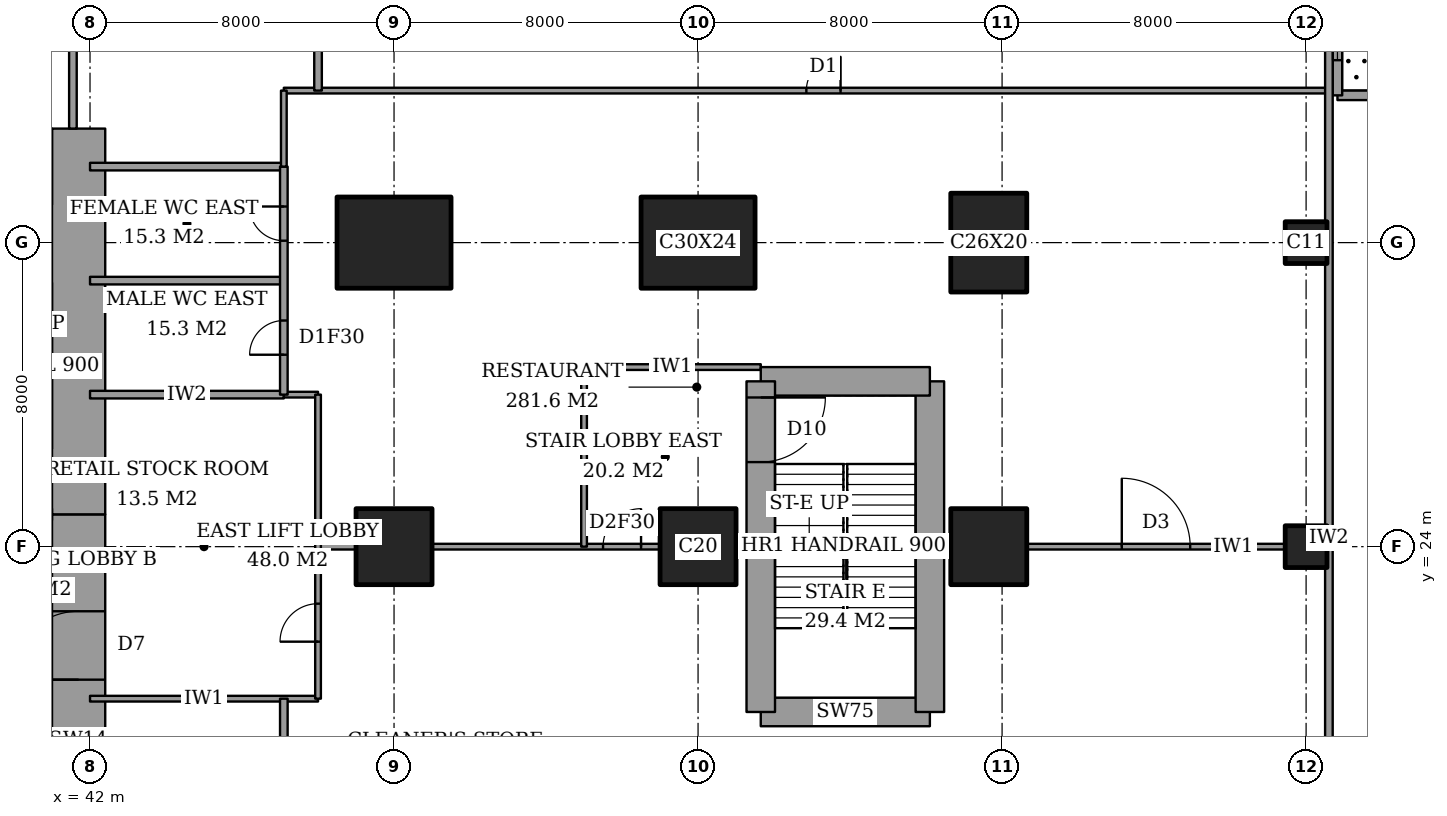
"""IFC4 building model, lengths in metres.
Left out: names, types, materials, properties, quantities, classifications, styles, units other than length and angle.
Written with IfcOpenShell. Run it as: python <this file> out.ifc"""

import sys

from ifc_helpers import new_model, si_unit, direction, frame, frame_2d, origin, origin_2d, place, context, subcontext, project, spatial, rectangle, extrude, element, fill, save


model = new_model("IFC4")
c1 = context("Model", 3, precision=1e-05, world=origin(), true_north=direction((0.0, 1.0)))
c2 = subcontext(c1, "Body", "Model", "MODEL_VIEW")
j1 = project(units=[si_unit("LENGTHUNIT", "METRE"), si_unit("PLANEANGLEUNIT", "RADIAN")], contexts=[c1])
p1 = place(None, origin())
s1 = spatial("IfcSite", under=j1, at=p1, CompositionType="ELEMENT")
p2 = place(p1, origin())
s2 = spatial("IfcBuilding", under=s1, at=p2, CompositionType="ELEMENT")
p3 = place(p2, origin())
s3 = spatial("IfcBuildingStorey", under=s2, at=p3, CompositionType="ELEMENT", Elevation=0.0)
p4 = place(p3, frame((50.0, 24.0, 0.0), z_axis=(0.0, 0.0, 1.0), x_axis=(1.0, 0.0, 0.0)))
e1 = element("IfcColumn", 1, at=p4, inside=s3, PredefinedType="COLUMN", context=c2, shape_type="SweptSolid", body=[
    extrude(rectangle(XDim=2.0, YDim=2.0, at=origin_2d()), origin(), (0.0, 0.0, 1.0), 6.0),
])
p5 = place(p3, frame((50.0, 32.0, 0.0), z_axis=(0.0, 0.0, 1.0), x_axis=(1.0, 0.0, 0.0)))
e2 = element("IfcColumn", 2, at=p5, inside=s3, PredefinedType="COLUMN", context=c2, shape_type="SweptSolid", body=[
    extrude(rectangle(XDim=3.0, YDim=2.4, at=origin_2d()), origin(), (0.0, 0.0, 1.0), 6.0),
])
p6 = place(p3, frame((58.0, 24.0, 0.0), z_axis=(0.0, 0.0, 1.0), x_axis=(1.0, 0.0, 0.0)))
e3 = element("IfcColumn", 3, at=p6, inside=s3, PredefinedType="COLUMN", context=c2, shape_type="SweptSolid", body=[
    extrude(rectangle(XDim=2.0, YDim=2.0, at=origin_2d()), origin(), (0.0, 0.0, 1.0), 6.0),
])
p7 = place(p3, frame((58.0, 32.0, 0.0), z_axis=(0.0, 0.0, 1.0), x_axis=(1.0, 0.0, 0.0)))
e4 = element("IfcColumn", 4, at=p7, inside=s3, PredefinedType="COLUMN", context=c2, shape_type="SweptSolid", body=[
    extrude(rectangle(XDim=3.0, YDim=2.4, at=origin_2d()), origin(), (0.0, 0.0, 1.0), 6.0),
])
p8 = place(p3, frame((65.65, 24.0, 0.0), z_axis=(0.0, 0.0, 1.0), x_axis=(1.0, 0.0, 0.0)))
e5 = element("IfcColumn", 5, at=p8, inside=s3, PredefinedType="COLUMN", context=c2, shape_type="SweptSolid", body=[
    extrude(rectangle(XDim=2.0, YDim=2.0, at=origin_2d()), origin(), (0.0, 0.0, 1.0), 6.0),
])
p9 = place(p3, frame((65.65, 32.0, 0.0), z_axis=(0.0, 0.0, 1.0), x_axis=(0.0, 1.0, 0.0)))
e6 = element("IfcColumn", 6, at=p9, inside=s3, PredefinedType="COLUMN", context=c2, shape_type="SweptSolid", body=[
    extrude(rectangle(XDim=2.6, YDim=2.0, at=origin_2d()), origin(), (0.0, 0.0, 1.0), 6.0),
])
for number, where, z_axis, x_axis in (
    (7, (74.0, 24.0, 0.0), (0.0, 0.0, 1.0), (1.0, 0.0, 0.0)),
    (8, (74.0, 32.0, 0.0), (0.0, 0.0, 1.0), (1.0, 0.0, 0.0)),
):
    element("IfcColumn", number, at=place(p3, frame(where, z_axis=z_axis, x_axis=x_axis)), inside=s3, PredefinedType="COLUMN", context=c2, shape_type="SweptSolid", body=[
        extrude(rectangle(XDim=1.1, YDim=1.1, at=origin_2d()), origin(), (0.0, 0.0, 1.0), 6.0),
    ])
p10 = place(p3, frame((41.7, 13.0, 0.0), z_axis=(0.0, 0.0, 1.0), x_axis=(0.0, 1.0, 0.0)))
e9 = element("IfcWall", 9, at=p10, inside=s3, PredefinedType="SHEAR", context=c2, shape_type="SweptSolid", body=[
    extrude(rectangle(XDim=11.85, YDim=1.4, at=frame_2d((5.925, 0.0))), origin(), (0.0, 0.0, 1.0), 6.0),
])
p11 = place(p10, frame((7.5, 0.0, 0.0)))
e10 = element("IfcOpeningElement", 10, at=p11, cuts=e9, PredefinedType="OPENING", context=c2, shape_type="SweptSolid", body=[
    extrude(rectangle(XDim=1.8, YDim=2.4, at=frame_2d((0.9, 1.2))), frame((0.0, 0.71, 0.0), z_axis=(0.0, -1.0, 0.0), x_axis=(1.0, 0.0, 0.0)), (0.0, 0.0, 1.0), 1.42),
])
p12 = place(p3, frame((41.7, 24.85, 0.0), z_axis=(0.0, 0.0, 1.0), x_axis=(0.0, 1.0, 0.0)))
e11 = element("IfcWall", 11, at=p12, inside=s3, PredefinedType="SHEAR", context=c2, shape_type="SweptSolid", body=[
    extrude(rectangle(XDim=10.15, YDim=1.4, at=frame_2d((5.075, 0.0))), origin(), (0.0, 0.0, 1.0), 6.0),
])
p13 = place(p3, frame((59.65, 19.65, 0.0), z_axis=(0.0, 0.0, 1.0), x_axis=(1.0, 0.0, 0.0)))
e12 = element("IfcWall", 12, at=p13, inside=s3, PredefinedType="SHEAR", context=c2, shape_type="SweptSolid", body=[
    extrude(rectangle(XDim=4.45, YDim=0.75, at=frame_2d((2.225, 0.0))), origin(), (0.0, 0.0, 1.0), 6.0),
])
p14 = place(p3, frame((64.1, 19.65, 0.0), z_axis=(0.0, 0.0, 1.0), x_axis=(0.0, 1.0, 0.0)))
e13 = element("IfcWall", 13, at=p14, inside=s3, PredefinedType="SHEAR", context=c2, shape_type="SweptSolid", body=[
    extrude(rectangle(XDim=8.7, YDim=0.75, at=frame_2d((4.35, 0.0))), origin(), (0.0, 0.0, 1.0), 6.0),
])
p15 = place(p3, frame((64.1, 28.35, 0.0), z_axis=(0.0, 0.0, 1.0), x_axis=(-1.0, 0.0, 0.0)))
e14 = element("IfcWall", 14, at=p15, inside=s3, PredefinedType="SHEAR", context=c2, shape_type="SweptSolid", body=[
    extrude(rectangle(XDim=4.45, YDim=0.75, at=frame_2d((2.225, 0.0))), origin(), (0.0, 0.0, 1.0), 6.0),
])
p16 = place(p3, frame((59.65, 28.35, 0.0), z_axis=(0.0, 0.0, 1.0), x_axis=(0.0, -1.0, 0.0)))
e15 = element("IfcWall", 15, at=p16, inside=s3, PredefinedType="SHEAR", context=c2, shape_type="SweptSolid", body=[
    extrude(rectangle(XDim=8.7, YDim=0.75, at=frame_2d((4.35, 0.0))), origin(), (0.0, 0.0, 1.0), 6.0),
])
p17 = place(p16, frame((0.425, 0.0, 0.0)))
e16 = element("IfcOpeningElement", 16, at=p17, cuts=e15, PredefinedType="OPENING", context=c2, shape_type="SweptSolid", body=[
    extrude(rectangle(XDim=1.7, YDim=2.1, at=frame_2d((0.85, 1.05))), frame((0.0, 0.385, 0.0), z_axis=(0.0, -1.0, 0.0), x_axis=(1.0, 0.0, 0.0)), (0.0, 0.0, 1.0), 0.77),
])
p18 = place(p3, frame((82.575, 35.875, 0.0), z_axis=(0.0, 0.0, 1.0), x_axis=(-1.0, 0.0, 0.0)))
e17 = element("IfcWall", 17, at=p18, inside=s3, PredefinedType="SOLIDWALL", context=c2, shape_type="SweptSolid", body=[
    extrude(rectangle(XDim=7.75, YDim=0.25, at=frame_2d((3.875, 0.0))), origin(), (0.0, 0.0, 1.0), 6.0),
])
p19 = place(p3, frame((74.825, 35.875, 0.0), z_axis=(0.0, 0.0, 1.0), x_axis=(0.0, 1.0, 0.0)))
e18 = element("IfcWall", 18, at=p19, inside=s3, PredefinedType="SOLIDWALL", context=c2, shape_type="SweptSolid", body=[
    extrude(rectangle(XDim=20.7, YDim=0.25, at=frame_2d((10.35, 0.0))), origin(), (0.0, 0.0, 1.0), 6.0),
])
p20 = place(p19, frame((4.925, 0.0, 0.3)))
e19 = element("IfcOpeningElement", 19, at=p20, cuts=e18, PredefinedType="OPENING", context=c2, shape_type="SweptSolid", body=[
    extrude(rectangle(XDim=2.4, YDim=3.6, at=frame_2d((1.2, 1.8))), frame((0.0, 0.135, 0.0), z_axis=(0.0, -1.0, 0.0), x_axis=(1.0, 0.0, 0.0)), (0.0, 0.0, 1.0), 0.27),
])
p21 = place(p19, frame((8.925, 0.0, 0.3)))
e20 = element("IfcOpeningElement", 20, at=p21, cuts=e18, PredefinedType="OPENING", context=c2, shape_type="SweptSolid", body=[
    extrude(rectangle(XDim=2.4, YDim=3.6, at=frame_2d((1.2, 1.8))), frame((0.0, 0.135, 0.0), z_axis=(0.0, -1.0, 0.0), x_axis=(1.0, 0.0, 0.0)), (0.0, 0.0, 1.0), 0.27),
])
p22 = place(p19, frame((0.925, 0.0, 0.3)))
e21 = element("IfcOpeningElement", 21, at=p22, cuts=e18, PredefinedType="OPENING", context=c2, shape_type="SweptSolid", body=[
    extrude(rectangle(XDim=2.4, YDim=3.6, at=frame_2d((1.2, 1.8))), frame((0.0, 0.135, 0.0), z_axis=(0.0, -1.0, 0.0), x_axis=(1.0, 0.0, 0.0)), (0.0, 0.0, 1.0), 0.27),
])
p23 = place(p3, frame((42.0, 20.0, 0.0), z_axis=(0.0, 0.0, 1.0), x_axis=(1.0, 0.0, 0.0)))
e22 = element("IfcWall", 22, at=p23, inside=s3, PredefinedType="PARTITIONING", context=c2, shape_type="SweptSolid", body=[
    extrude(rectangle(XDim=6.0, YDim=0.15, at=frame_2d((3.0, 0.0))), origin(), (0.0, 0.0, 1.0), 5.7),
])
p24 = place(p3, frame((48.0, 24.0, 0.0), z_axis=(0.0, 0.0, 1.0), x_axis=(1.0, 0.0, 0.0)))
e23 = element("IfcWall", 23, at=p24, inside=s3, PredefinedType="PARTITIONING", context=c2, shape_type="SweptSolid", body=[
    extrude(rectangle(XDim=1.0, YDim=0.15, at=frame_2d((0.5, 0.0))), origin(), (0.0, 0.0, 1.0), 5.7),
])
p25 = place(p3, frame((51.0, 24.0, 0.0), z_axis=(0.0, 0.0, 1.0), x_axis=(1.0, 0.0, 0.0)))
e24 = element("IfcWall", 24, at=p25, inside=s3, PredefinedType="PARTITIONING", context=c2, shape_type="SweptSolid", body=[
    extrude(rectangle(XDim=6.0, YDim=0.15, at=frame_2d((3.0, 0.0))), origin(), (0.0, 0.0, 1.0), 4.3),
])
p26 = place(p25, frame((4.5, 0.0, 0.0)))
e25 = element("IfcOpeningElement", 25, at=p26, cuts=e24, PredefinedType="OPENING", context=c2, shape_type="SweptSolid", body=[
    extrude(rectangle(XDim=1.0, YDim=2.1, at=frame_2d((0.5, 1.05))), frame((0.0, 0.085, 0.0), z_axis=(0.0, -1.0, 0.0), x_axis=(1.0, 0.0, 0.0)), (0.0, 0.0, 1.0), 0.17),
])
p27 = place(p3, frame((66.65, 24.0, 0.0), z_axis=(0.0, 0.0, 1.0), x_axis=(1.0, 0.0, 0.0)))
e26 = element("IfcWall", 26, at=p27, inside=s3, PredefinedType="PARTITIONING", context=c2, shape_type="SweptSolid", body=[
    extrude(rectangle(XDim=6.8, YDim=0.15, at=frame_2d((3.4, 0.0))), origin(), (0.0, 0.0, 1.0), 4.3),
])
p28 = place(p27, frame((2.5, 0.0, 0.0)))
e27 = element("IfcOpeningElement", 27, at=p28, cuts=e26, PredefinedType="OPENING", context=c2, shape_type="SweptSolid", body=[
    extrude(rectangle(XDim=1.8, YDim=2.1, at=frame_2d((0.9, 1.05))), frame((0.0, 0.085, 0.0), z_axis=(0.0, -1.0, 0.0), x_axis=(1.0, 0.0, 0.0)), (0.0, 0.0, 1.0), 0.17),
])
p29 = place(p3, frame((42.0, 28.0, 0.0), z_axis=(0.0, 0.0, 1.0), x_axis=(1.0, 0.0, 0.0)))
e28 = element("IfcWall", 28, at=p29, inside=s3, PredefinedType="PARTITIONING", context=c2, shape_type="SweptSolid", body=[
    extrude(rectangle(XDim=5.1, YDim=0.2, at=frame_2d((2.55, 0.0))), origin(), (0.0, 0.0, 1.0), 5.7),
])
p30 = place(p3, frame((47.1, 28.0, 0.0), z_axis=(0.0, 0.0, 1.0), x_axis=(1.0, 0.0, 0.0)))
e29 = element("IfcWall", 29, at=p30, inside=s3, PredefinedType="PARTITIONING", context=c2, shape_type="SweptSolid", body=[
    extrude(rectangle(XDim=0.9, YDim=0.15, at=frame_2d((0.45, 0.0))), origin(), (0.0, 0.0, 1.0), 5.7),
])
p31 = place(p3, frame((55.0, 28.725, 0.0), z_axis=(0.0, 0.0, 1.0), x_axis=(1.0, 0.0, 0.0)))
e30 = element("IfcWall", 30, at=p31, inside=s3, PredefinedType="PARTITIONING", context=c2, shape_type="SweptSolid", body=[
    extrude(rectangle(XDim=4.65, YDim=0.15, at=frame_2d((2.325, 0.0))), origin(), (0.0, 0.0, 1.0), 5.7),
])
for number, where, z_axis, x_axis in (
    (31, (42.0, 31.0, 0.0), (0.0, 0.0, 1.0), (1.0, 0.0, 0.0)),
    (32, (42.0, 34.0, 0.0), (0.0, 0.0, 1.0), (1.0, 0.0, 0.0)),
):
    element("IfcWall", number, at=place(p3, frame(where, z_axis=z_axis, x_axis=x_axis)), inside=s3, PredefinedType="PARTITIONING", context=c2, shape_type="SweptSolid", body=[
        extrude(rectangle(XDim=5.1, YDim=0.2, at=frame_2d((2.55, 0.0))), origin(), (0.0, 0.0, 1.0), 5.7),
    ])
p32 = place(p3, frame((47.1, 36.0, 0.0), z_axis=(0.0, 0.0, 1.0), x_axis=(1.0, 0.0, 0.0)))
e33 = element("IfcWall", 33, at=p32, inside=s3, PredefinedType="PARTITIONING", context=c2, shape_type="SweptSolid", body=[
    extrude(rectangle(XDim=27.5, YDim=0.15, at=frame_2d((13.75, 0.0))), origin(), (0.0, 0.0, 1.0), 5.7),
])
p33 = place(p32, frame((13.75, 0.0, 0.0)))
e34 = element("IfcOpeningElement", 34, at=p33, cuts=e33, PredefinedType="OPENING", context=c2, shape_type="SweptSolid", body=[
    extrude(rectangle(XDim=0.9, YDim=2.1, at=frame_2d((0.45, 1.05))), frame((0.0, 0.085, 0.0), z_axis=(0.0, -1.0, 0.0), x_axis=(1.0, 0.0, 0.0)), (0.0, 0.0, 1.0), 0.17),
])
p34 = place(p3, frame((41.55, 35.0, 0.0), z_axis=(0.0, 0.0, 1.0), x_axis=(0.0, 1.0, 0.0)))
e35 = element("IfcWall", 35, at=p34, inside=s3, PredefinedType="PARTITIONING", context=c2, shape_type="SweptSolid", body=[
    extrude(rectangle(XDim=3.7, YDim=0.2, at=frame_2d((1.85, 0.0))), origin(), (0.0, 0.0, 1.0), 5.7),
])
p35 = place(p3, frame((47.1, 0.0, 0.0), z_axis=(0.0, 0.0, 1.0), x_axis=(0.0, 1.0, 0.0)))
e36 = element("IfcWall", 36, at=p35, inside=s3, PredefinedType="PARTITIONING", context=c2, shape_type="SweptSolid", body=[
    extrude(rectangle(XDim=20.0, YDim=0.2, at=frame_2d((10.0, 0.0))), origin(), (0.0, 0.0, 1.0), 5.7),
])
p36 = place(p35, frame((15.05, 0.0, 0.0)))
e37 = element("IfcOpeningElement", 37, at=p36, cuts=e36, PredefinedType="OPENING", context=c2, shape_type="SweptSolid", body=[
    extrude(rectangle(XDim=0.9, YDim=2.1, at=frame_2d((0.45, 1.05))), frame((0.0, 0.11, 0.0), z_axis=(0.0, -1.0, 0.0), x_axis=(1.0, 0.0, 0.0)), (0.0, 0.0, 1.0), 0.22),
])
p37 = place(p35, frame((18.05, 0.0, 0.0)))
e38 = element("IfcOpeningElement", 38, at=p37, cuts=e36, PredefinedType="OPENING", context=c2, shape_type="SweptSolid", body=[
    extrude(rectangle(XDim=0.9, YDim=2.1, at=frame_2d((0.45, 1.05))), frame((0.0, 0.11, 0.0), z_axis=(0.0, -1.0, 0.0), x_axis=(1.0, 0.0, 0.0)), (0.0, 0.0, 1.0), 0.22),
])
p38 = place(p3, frame((47.1, 28.0, 0.0), z_axis=(0.0, 0.0, 1.0), x_axis=(0.0, 1.0, 0.0)))
e39 = element("IfcWall", 39, at=p38, inside=s3, PredefinedType="PARTITIONING", context=c2, shape_type="SweptSolid", body=[
    extrude(rectangle(XDim=6.0, YDim=0.2, at=frame_2d((3.0, 0.0))), origin(), (0.0, 0.0, 1.0), 5.7),
])
p39 = place(p38, frame((1.05, 0.0, 0.0)))
e40 = element("IfcOpeningElement", 40, at=p39, cuts=e39, PredefinedType="OPENING", context=c2, shape_type="SweptSolid", body=[
    extrude(rectangle(XDim=0.9, YDim=2.1, at=frame_2d((0.45, 1.05))), frame((0.0, 0.11, 0.0), z_axis=(0.0, -1.0, 0.0), x_axis=(1.0, 0.0, 0.0)), (0.0, 0.0, 1.0), 0.22),
])
p40 = place(p38, frame((4.05, 0.0, 0.0)))
e41 = element("IfcOpeningElement", 41, at=p40, cuts=e39, PredefinedType="OPENING", context=c2, shape_type="SweptSolid", body=[
    extrude(rectangle(XDim=0.9, YDim=2.1, at=frame_2d((0.45, 1.05))), frame((0.0, 0.11, 0.0), z_axis=(0.0, -1.0, 0.0), x_axis=(1.0, 0.0, 0.0)), (0.0, 0.0, 1.0), 0.22),
])
p41 = place(p3, frame((47.1, 34.0, 0.0), z_axis=(0.0, 0.0, 1.0), x_axis=(0.0, 1.0, 0.0)))
e42 = element("IfcWall", 42, at=p41, inside=s3, PredefinedType="PARTITIONING", context=c2, shape_type="SweptSolid", body=[
    extrude(rectangle(XDim=2.0, YDim=0.15, at=frame_2d((1.0, 0.0))), origin(), (0.0, 0.0, 1.0), 5.7),
])
p42 = place(p3, frame((48.0, 36.0, 0.0), z_axis=(0.0, 0.0, 1.0), x_axis=(0.0, 1.0, 0.0)))
e43 = element("IfcWall", 43, at=p42, inside=s3, PredefinedType="PARTITIONING", context=c2, shape_type="SweptSolid", body=[
    extrude(rectangle(XDim=12.45, YDim=0.2, at=frame_2d((6.225, 0.0))), origin(), (0.0, 0.0, 1.0), 5.7),
])
p43 = place(p3, frame((48.0, 20.0, 0.0), z_axis=(0.0, 0.0, 1.0), x_axis=(0.0, 1.0, 0.0)))
e44 = element("IfcWall", 44, at=p43, inside=s3, PredefinedType="PARTITIONING", context=c2, shape_type="SweptSolid", body=[
    extrude(rectangle(XDim=8.0, YDim=0.15, at=frame_2d((4.0, 0.0))), origin(), (0.0, 0.0, 1.0), 5.7),
])
p44 = place(p43, frame((1.5, 0.0, 0.0)))
e45 = element("IfcOpeningElement", 45, at=p44, cuts=e44, PredefinedType="OPENING", context=c2, shape_type="SweptSolid", body=[
    extrude(rectangle(XDim=1.0, YDim=2.1, at=frame_2d((0.5, 1.05))), frame((0.0, 0.085, 0.0), z_axis=(0.0, -1.0, 0.0), x_axis=(1.0, 0.0, 0.0)), (0.0, 0.0, 1.0), 0.17),
])
p45 = place(p3, frame((55.0, 24.0, 0.0), z_axis=(0.0, 0.0, 1.0), x_axis=(0.0, 1.0, 0.0)))
e46 = element("IfcWall", 46, at=p45, inside=s3, PredefinedType="PARTITIONING", context=c2, shape_type="SweptSolid", body=[
    extrude(rectangle(XDim=4.725, YDim=0.15, at=frame_2d((2.363, 0.0))), origin(), (0.0, 0.0, 1.0), 5.7),
])
p46 = place(p3, frame((74.6, 0.0, 0.0), z_axis=(0.0, 0.0, 1.0), x_axis=(0.0, 1.0, 0.0)))
e47 = element("IfcWall", 47, at=p46, inside=s3, PredefinedType="PARTITIONING", context=c2, shape_type="SweptSolid", body=[
    extrude(rectangle(XDim=48.45, YDim=0.2, at=frame_2d((24.225, 0.0))), origin(), (0.0, 0.0, 1.0), 5.7),
])
p47 = place(p22, origin())
e48 = element("IfcWindow", 48, at=p47, inside=s3, PartitioningType="SINGLE_PANEL", PredefinedType="WINDOW", context=c2, shape_type="SweptSolid", body=[
    extrude(rectangle(XDim=2.4, YDim=3.6, at=frame_2d((1.2, 1.8))), frame((0.0, 0.03, 0.0), z_axis=(0.0, -1.0, 0.0), x_axis=(1.0, 0.0, 0.0)), (0.0, 0.0, 1.0), 0.06),
])
fill(e21, e48)
p48 = place(p44, origin())
e49 = element("IfcDoor", 49, at=p48, inside=s3, OperationType="SINGLE_SWING_RIGHT", PredefinedType="DOOR", context=c2, shape_type="SweptSolid", body=[
    extrude(rectangle(XDim=1.0, YDim=2.1, at=frame_2d((0.5, 1.05))), frame((0.0, 0.025, 0.0), z_axis=(0.0, -1.0, 0.0), x_axis=(1.0, 0.0, 0.0)), (0.0, 0.0, 1.0), 0.05),
])
fill(e45, e49)
p49 = place(p26, origin())
e50 = element("IfcDoor", 50, at=p49, inside=s3, OperationType="SINGLE_SWING_LEFT", PredefinedType="DOOR", context=c2, shape_type="SweptSolid", body=[
    extrude(rectangle(XDim=1.0, YDim=2.1, at=frame_2d((0.5, 1.05))), frame((0.0, 0.025, 0.0), z_axis=(0.0, -1.0, 0.0), x_axis=(1.0, 0.0, 0.0)), (0.0, 0.0, 1.0), 0.05),
])
fill(e25, e50)
p50 = place(p28, origin())
e51 = element("IfcDoor", 51, at=p50, inside=s3, OperationType="DOUBLE_DOOR_DOUBLE_SWING", PredefinedType="DOOR", context=c2, shape_type="SweptSolid", body=[
    extrude(rectangle(XDim=1.8, YDim=2.1, at=frame_2d((0.9, 1.05))), frame((0.0, 0.025, 0.0), z_axis=(0.0, -1.0, 0.0), x_axis=(1.0, 0.0, 0.0)), (0.0, 0.0, 1.0), 0.05),
])
fill(e27, e51)
p51 = place(p33, origin())
e52 = element("IfcDoor", 52, at=p51, inside=s3, OperationType="SINGLE_SWING_LEFT", PredefinedType="DOOR", context=c2, shape_type="SweptSolid", body=[
    extrude(rectangle(XDim=0.9, YDim=2.1, at=frame_2d((0.45, 1.05))), frame((0.0, 0.025, 0.0), z_axis=(0.0, -1.0, 0.0), x_axis=(1.0, 0.0, 0.0)), (0.0, 0.0, 1.0), 0.05),
])
fill(e34, e52)
p52 = place(p39, origin())
e53 = element("IfcDoor", 53, at=p52, inside=s3, OperationType="SINGLE_SWING_RIGHT", PredefinedType="DOOR", context=c2, shape_type="SweptSolid", body=[
    extrude(rectangle(XDim=0.9, YDim=2.1, at=frame_2d((0.45, 1.05))), frame((0.0, 0.025, 0.0), z_axis=(0.0, -1.0, 0.0), x_axis=(1.0, 0.0, 0.0)), (0.0, 0.0, 1.0), 0.05),
])
fill(e40, e53)
p53 = place(p40, origin())
e54 = element("IfcDoor", 54, at=p53, inside=s3, OperationType="SINGLE_SWING_LEFT", PredefinedType="DOOR", context=c2, shape_type="SweptSolid", body=[
    extrude(rectangle(XDim=0.9, YDim=2.1, at=frame_2d((0.45, 1.05))), frame((0.0, 0.025, 0.0), z_axis=(0.0, -1.0, 0.0), x_axis=(1.0, 0.0, 0.0)), (0.0, 0.0, 1.0), 0.05),
])
fill(e41, e54)
p54 = place(p11, origin())
e55 = element("IfcDoor", 55, at=p54, inside=s3, OperationType="DOUBLE_DOOR_DOUBLE_SWING", PredefinedType="DOOR", context=c2, shape_type="SweptSolid", body=[
    extrude(rectangle(XDim=1.8, YDim=2.4, at=frame_2d((0.9, 1.2))), frame((0.0, 0.225, 0.0), z_axis=(0.0, -1.0, 0.0), x_axis=(1.0, 0.0, 0.0)), (0.0, 0.0, 1.0), 0.05),
])
fill(e10, e55)
p55 = place(p17, origin())
e56 = element("IfcDoor", 56, at=p55, inside=s3, OperationType="DOUBLE_DOOR_SINGLE_SWING", PredefinedType="DOOR", context=c2, shape_type="SweptSolid", body=[
    extrude(rectangle(XDim=1.7, YDim=2.1, at=frame_2d((0.85, 1.05))), frame((0.0, 0.025, 0.0), z_axis=(0.0, -1.0, 0.0), x_axis=(1.0, 0.0, 0.0)), (0.0, 0.0, 1.0), 0.05),
])
fill(e16, e56)
save(model, sys.argv[1])
